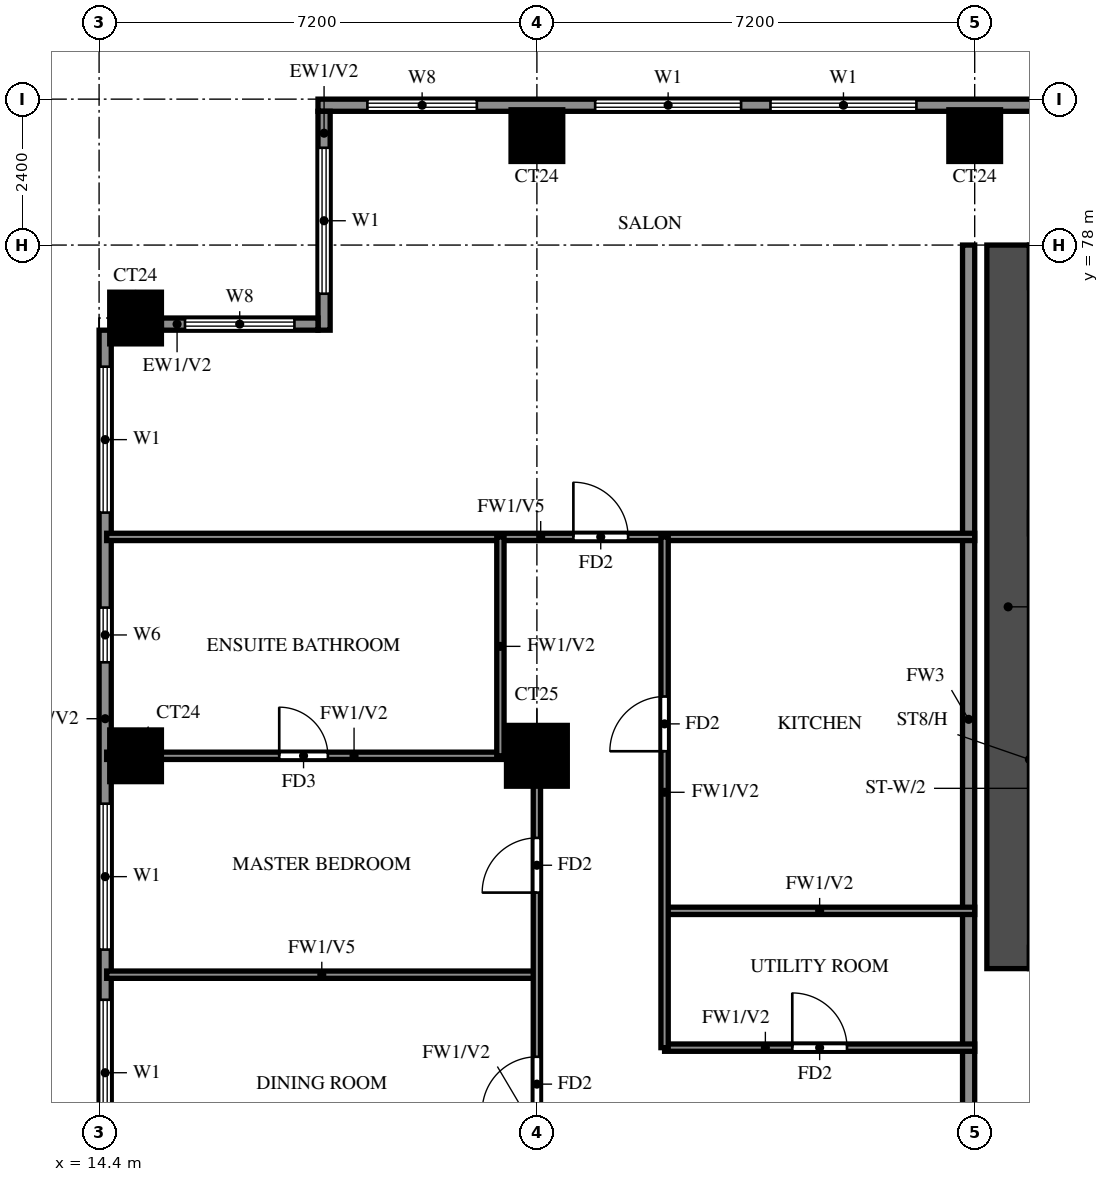
"""IFC4 building model, lengths in metres.
Left out: names, types, materials, properties, quantities, classifications, styles, units other than length and angle.
Written with IfcOpenShell. Run it as: python <this file> out.ifc"""

import sys

from ifc_helpers import new_model, si_unit, direction, frame, frame_2d, origin, origin_2d, place, context, subcontext, project, spatial, rectangle, extrude, source, transform, mapped, element, fill, save


model = new_model("IFC4")
c1 = context("Model", 3, precision=1e-05, world=origin(), true_north=direction((0.0, 1.0)))
c2 = subcontext(c1, "Body", "Model", "MODEL_VIEW")
j1 = project(units=[si_unit("LENGTHUNIT", "METRE"), si_unit("PLANEANGLEUNIT", "RADIAN")], contexts=[c1])
p1 = place(None, origin())
s1 = spatial("IfcSite", under=j1, at=p1, CompositionType="ELEMENT")
p2 = place(p1, origin())
s2 = spatial("IfcBuilding", under=s1, at=p2, CompositionType="ELEMENT")
p3 = place(p2, frame((0.0, 0.0, 143.0)))
s3 = spatial("IfcBuildingStorey", under=s2, at=p3, CompositionType="ELEMENT", Elevation=143.0)
m1 = source(origin(), c2, "Body", "SweptSolid", [
    extrude(rectangle(XDim=0.85, YDim=0.85, at=origin_2d()), origin(), (0.0, 0.0, 1.0), 3.2),
])
p4 = place(p3, frame((15.0, 69.6, 0.0), z_axis=(0.0, 0.0, 1.0), x_axis=(1.0, 0.0, 0.0)))
e1 = element("IfcColumn", 1, at=p4, inside=s3, PredefinedType="COLUMN", context=c2, shape_type="MappedRepresentation", body=[
    mapped(m1, transform((0.0, 0.0, 0.0))),
])
m2 = source(origin(), c2, "Body", "SweptSolid", [
    extrude(rectangle(XDim=1.0, YDim=1.0, at=origin_2d()), origin(), (0.0, 0.0, 1.0), 3.2),
])
p5 = place(p3, frame((21.6, 69.6, 0.0), z_axis=(0.0, 0.0, 1.0), x_axis=(1.0, 0.0, 0.0)))
e2 = element("IfcColumn", 2, at=p5, inside=s3, PredefinedType="COLUMN", context=c2, shape_type="MappedRepresentation", body=[
    mapped(m2, transform((0.0, 0.0, 0.0))),
])
for number, where, z_axis, x_axis in (
    (3, (15.0, 76.8, 0.0), (0.0, 0.0, 1.0), (1.0, 0.0, 0.0)),
    (4, (21.6, 79.8, 0.0), (0.0, 0.0, 1.0), (1.0, 0.0, 0.0)),
    (5, (28.8, 79.8, 0.0), (0.0, 0.0, 1.0), (1.0, 0.0, 0.0)),
):
    element("IfcColumn", number, at=place(p3, frame(where, z_axis=z_axis, x_axis=x_axis)), inside=s3, PredefinedType="COLUMN", context=c2, shape_type="MappedRepresentation", body=[
        mapped(m1, transform((0.0, 0.0, 0.0))),
    ])
p6 = place(p3, frame((29.35, 66.1, 0.0), z_axis=(0.0, 0.0, 1.0), x_axis=(0.0, 1.0, 0.0)))
e6 = element("IfcWall", 6, at=p6, inside=s3, PredefinedType="SHEAR", context=c2, shape_type="SweptSolid", body=[
    extrude(rectangle(XDim=11.9, YDim=0.7, at=frame_2d((5.95, 0.0))), origin(), (0.0, 0.0, 1.0), 3.2),
])
p7 = place(p3, frame((82.6, 80.3, 0.0), z_axis=(0.0, 0.0, 1.0), x_axis=(-1.0, 0.0, 0.0)))
e7 = element("IfcWall", 7, at=p7, inside=s3, PredefinedType="SOLIDWALL", context=c2, shape_type="SweptSolid", body=[
    extrude(rectangle(XDim=64.6, YDim=0.2, at=frame_2d((32.3, 0.0))), origin(), (0.0, 0.0, 1.0), 3.2),
])
p8 = place(p7, frame((7.9, 0.0, 0.0)))
e8 = element("IfcOpeningElement", 8, at=p8, cuts=e7, PredefinedType="OPENING", context=c2, shape_type="SweptSolid", body=[
    extrude(rectangle(XDim=1.8, YDim=2.4, at=frame_2d((0.9, 1.2))), frame((0.0, 0.11, 0.0), z_axis=(0.0, -1.0, 0.0), x_axis=(1.0, 0.0, 0.0)), (0.0, 0.0, 1.0), 0.22),
])
p9 = place(p7, frame((54.758, 0.0, 0.6)))
e9 = element("IfcOpeningElement", 9, at=p9, cuts=e7, PredefinedType="OPENING", context=c2, shape_type="SweptSolid", body=[
    extrude(rectangle(XDim=2.4, YDim=2.4, at=frame_2d((1.2, 1.2))), frame((0.0, 0.11, 0.0), z_axis=(0.0, -1.0, 0.0), x_axis=(1.0, 0.0, 0.0)), (0.0, 0.0, 1.0), 0.22),
])
p10 = place(p7, frame((57.642, 0.0, 0.6)))
e10 = element("IfcOpeningElement", 10, at=p10, cuts=e7, PredefinedType="OPENING", context=c2, shape_type="SweptSolid", body=[
    extrude(rectangle(XDim=2.4, YDim=2.4, at=frame_2d((1.2, 1.2))), frame((0.0, 0.11, 0.0), z_axis=(0.0, -1.0, 0.0), x_axis=(1.0, 0.0, 0.0)), (0.0, 0.0, 1.0), 0.22),
])
p11 = place(p7, frame((61.988, 0.0, 0.6)))
e11 = element("IfcOpeningElement", 11, at=p11, cuts=e7, PredefinedType="OPENING", context=c2, shape_type="SweptSolid", body=[
    extrude(rectangle(XDim=1.8, YDim=2.4, at=frame_2d((0.9, 1.2))), frame((0.0, 0.11, 0.0), z_axis=(0.0, -1.0, 0.0), x_axis=(1.0, 0.0, 0.0)), (0.0, 0.0, 1.0), 0.22),
])
p12 = place(p7, frame((0.712, 0.0, 0.6)))
e12 = element("IfcOpeningElement", 12, at=p12, cuts=e7, PredefinedType="OPENING", context=c2, shape_type="SweptSolid", body=[
    extrude(rectangle(XDim=1.8, YDim=2.4, at=frame_2d((0.9, 1.2))), frame((0.0, 0.11, 0.0), z_axis=(0.0, -1.0, 0.0), x_axis=(1.0, 0.0, 0.0)), (0.0, 0.0, 1.0), 0.22),
])
p13 = place(p7, frame((3.887, 0.0, 0.6)))
e13 = element("IfcOpeningElement", 13, at=p13, cuts=e7, PredefinedType="OPENING", context=c2, shape_type="SweptSolid", body=[
    extrude(rectangle(XDim=1.8, YDim=2.4, at=frame_2d((0.9, 1.2))), frame((0.0, 0.11, 0.0), z_axis=(0.0, -1.0, 0.0), x_axis=(1.0, 0.0, 0.0)), (0.0, 0.0, 1.0), 0.22),
])
p14 = place(p7, frame((6.55, 0.0, 0.6)))
e14 = element("IfcOpeningElement", 14, at=p14, cuts=e7, PredefinedType="OPENING", context=c2, shape_type="SweptSolid", body=[
    extrude(rectangle(XDim=0.9, YDim=2.4, at=frame_2d((0.45, 1.2))), frame((0.0, 0.11, 0.0), z_axis=(0.0, -1.0, 0.0), x_axis=(1.0, 0.0, 0.0)), (0.0, 0.0, 1.0), 0.22),
])
p15 = place(p3, frame((18.1, 80.2, 0.0), z_axis=(0.0, 0.0, 1.0), x_axis=(0.0, -1.0, 0.0)))
e15 = element("IfcWall", 15, at=p15, inside=s3, PredefinedType="SOLIDWALL", context=c2, shape_type="SweptSolid", body=[
    extrude(rectangle(XDim=3.6, YDim=0.2, at=frame_2d((1.8, 0.0))), origin(), (0.0, 0.0, 1.0), 3.2),
])
p16 = place(p15, frame((0.6, 0.0, 0.6)))
e16 = element("IfcOpeningElement", 16, at=p16, cuts=e15, PredefinedType="OPENING", context=c2, shape_type="SweptSolid", body=[
    extrude(rectangle(XDim=2.4, YDim=2.4, at=frame_2d((1.2, 1.2))), frame((0.0, 0.11, 0.0), z_axis=(0.0, -1.0, 0.0), x_axis=(1.0, 0.0, 0.0)), (0.0, 0.0, 1.0), 0.22),
])
p17 = place(p3, frame((18.0, 76.7, 0.0), z_axis=(0.0, 0.0, 1.0), x_axis=(-1.0, 0.0, 0.0)))
e17 = element("IfcWall", 17, at=p17, inside=s3, PredefinedType="SOLIDWALL", context=c2, shape_type="SweptSolid", body=[
    extrude(rectangle(XDim=2.575, YDim=0.2, at=frame_2d((1.288, 0.0))), origin(), (0.0, 0.0, 1.0), 3.2),
])
p18 = place(p17, frame((0.387, 0.0, 0.6)))
e18 = element("IfcOpeningElement", 18, at=p18, cuts=e17, PredefinedType="OPENING", context=c2, shape_type="SweptSolid", body=[
    extrude(rectangle(XDim=1.8, YDim=2.4, at=frame_2d((0.9, 1.2))), frame((0.0, 0.11, 0.0), z_axis=(0.0, -1.0, 0.0), x_axis=(1.0, 0.0, 0.0)), (0.0, 0.0, 1.0), 0.22),
])
p19 = place(p3, frame((14.5, 76.6, 0.0), z_axis=(0.0, 0.0, 1.0), x_axis=(0.0, -1.0, 0.0)))
e19 = element("IfcWall", 19, at=p19, inside=s3, PredefinedType="SOLIDWALL", context=c2, shape_type="SweptSolid", body=[
    extrude(rectangle(XDim=14.2, YDim=0.2, at=frame_2d((7.1, 0.0))), origin(), (0.0, 0.0, 1.0), 3.2),
])
p20 = place(p19, frame((11.012, 0.0, 0.6)))
e20 = element("IfcOpeningElement", 20, at=p20, cuts=e19, PredefinedType="OPENING", context=c2, shape_type="SweptSolid", body=[
    extrude(rectangle(XDim=2.4, YDim=2.4, at=frame_2d((1.2, 1.2))), frame((0.0, 0.11, 0.0), z_axis=(0.0, -1.0, 0.0), x_axis=(1.0, 0.0, 0.0)), (0.0, 0.0, 1.0), 0.22),
])
p21 = place(p19, frame((7.788, 0.0, 0.6)))
e21 = element("IfcOpeningElement", 21, at=p21, cuts=e19, PredefinedType="OPENING", context=c2, shape_type="SweptSolid", body=[
    extrude(rectangle(XDim=2.4, YDim=2.4, at=frame_2d((1.2, 1.2))), frame((0.0, 0.11, 0.0), z_axis=(0.0, -1.0, 0.0), x_axis=(1.0, 0.0, 0.0)), (0.0, 0.0, 1.0), 0.22),
])
p22 = place(p19, frame((4.562, 0.0, 1.5)))
e22 = element("IfcOpeningElement", 22, at=p22, cuts=e19, PredefinedType="OPENING", context=c2, shape_type="SweptSolid", body=[
    extrude(rectangle(XDim=0.9, YDim=0.9, at=frame_2d((0.45, 0.45))), frame((0.0, 0.11, 0.0), z_axis=(0.0, -1.0, 0.0), x_axis=(1.0, 0.0, 0.0)), (0.0, 0.0, 1.0), 0.22),
])
p23 = place(p19, frame((0.6, 0.0, 0.6)))
e23 = element("IfcOpeningElement", 23, at=p23, cuts=e19, PredefinedType="OPENING", context=c2, shape_type="SweptSolid", body=[
    extrude(rectangle(XDim=2.4, YDim=2.4, at=frame_2d((1.2, 1.2))), frame((0.0, 0.11, 0.0), z_axis=(0.0, -1.0, 0.0), x_axis=(1.0, 0.0, 0.0)), (0.0, 0.0, 1.0), 0.22),
])
p24 = place(p3, frame((28.7, 62.4, 0.0), z_axis=(0.0, 0.0, 1.0), x_axis=(0.0, 1.0, 0.0)))
e24 = element("IfcWall", 24, at=p24, inside=s3, PredefinedType="SOLIDWALL", context=c2, shape_type="SweptSolid", body=[
    extrude(rectangle(XDim=15.6, YDim=0.2, at=frame_2d((7.8, 0.0))), origin(), (0.0, 0.0, 1.0), 3.2),
])
p25 = place(p3, frame((23.7, 64.8, 0.0), z_axis=(0.0, 0.0, 1.0), x_axis=(1.0, 0.0, 0.0)))
e25 = element("IfcWall", 25, at=p25, inside=s3, PredefinedType="PARTITIONING", context=c2, shape_type="SweptSolid", body=[
    extrude(rectangle(XDim=5.1, YDim=0.12, at=frame_2d((2.55, 0.0))), origin(), (0.0, 0.0, 1.0), 3.2),
])
p26 = place(p25, frame((2.1, 0.0, 0.0)))
e26 = element("IfcOpeningElement", 26, at=p26, cuts=e25, PredefinedType="OPENING", context=c2, shape_type="SweptSolid", body=[
    extrude(rectangle(XDim=0.9, YDim=2.1, at=frame_2d((0.45, 1.05))), frame((0.0, 0.07, 0.0), z_axis=(0.0, -1.0, 0.0), x_axis=(1.0, 0.0, 0.0)), (0.0, 0.0, 1.0), 0.14),
])
p27 = place(p3, frame((14.525, 66.0, 0.0), z_axis=(0.0, 0.0, 1.0), x_axis=(1.0, 0.0, 0.0)))
e27 = element("IfcWall", 27, at=p27, inside=s3, PredefinedType="PARTITIONING", context=c2, shape_type="SweptSolid", body=[
    extrude(rectangle(XDim=7.075, YDim=0.12, at=frame_2d((3.538, 0.0))), origin(), (0.0, 0.0, 1.0), 2.3),
])
p28 = place(p3, frame((23.7, 67.05, 0.0), z_axis=(0.0, 0.0, 1.0), x_axis=(1.0, 0.0, 0.0)))
e28 = element("IfcWall", 28, at=p28, inside=s3, PredefinedType="PARTITIONING", context=c2, shape_type="SweptSolid", body=[
    extrude(rectangle(XDim=5.1, YDim=0.12, at=frame_2d((2.55, 0.0))), origin(), (0.0, 0.0, 1.0), 3.2),
])
p29 = place(p3, frame((14.525, 69.6, 0.0), z_axis=(0.0, 0.0, 1.0), x_axis=(1.0, 0.0, 0.0)))
e29 = element("IfcWall", 29, at=p29, inside=s3, PredefinedType="PARTITIONING", context=c2, shape_type="SweptSolid", body=[
    extrude(rectangle(XDim=7.075, YDim=0.12, at=frame_2d((3.538, 0.0))), origin(), (0.0, 0.0, 1.0), 3.2),
])
p30 = place(p29, frame((2.837, 0.0, 0.0)))
e30 = element("IfcOpeningElement", 30, at=p30, cuts=e29, PredefinedType="OPENING", context=c2, shape_type="SweptSolid", body=[
    extrude(rectangle(XDim=0.8, YDim=2.1, at=frame_2d((0.4, 1.05))), frame((0.0, 0.07, 0.0), z_axis=(0.0, -1.0, 0.0), x_axis=(1.0, 0.0, 0.0)), (0.0, 0.0, 1.0), 0.14),
])
p31 = place(p3, frame((14.525, 73.2, 0.0), z_axis=(0.0, 0.0, 1.0), x_axis=(1.0, 0.0, 0.0)))
e31 = element("IfcWall", 31, at=p31, inside=s3, PredefinedType="PARTITIONING", context=c2, shape_type="SweptSolid", body=[
    extrude(rectangle(XDim=14.275, YDim=0.12, at=frame_2d((7.138, 0.0))), origin(), (0.0, 0.0, 1.0), 2.3),
])
p32 = place(p31, frame((7.675, 0.0, 0.0)))
e32 = element("IfcOpeningElement", 32, at=p32, cuts=e31, PredefinedType="OPENING", context=c2, shape_type="SweptSolid", body=[
    extrude(rectangle(XDim=0.9, YDim=2.1, at=frame_2d((0.45, 1.05))), frame((0.0, 0.07, 0.0), z_axis=(0.0, -1.0, 0.0), x_axis=(1.0, 0.0, 0.0)), (0.0, 0.0, 1.0), 0.14),
])
p33 = place(p3, frame((21.0, 69.6, 0.0), z_axis=(0.0, 0.0, 1.0), x_axis=(0.0, 1.0, 0.0)))
e33 = element("IfcWall", 33, at=p33, inside=s3, PredefinedType="PARTITIONING", context=c2, shape_type="SweptSolid", body=[
    extrude(rectangle(XDim=3.6, YDim=0.12, at=frame_2d((1.8, 0.0))), origin(), (0.0, 0.0, 1.0), 3.2),
])
p34 = place(p3, frame((21.6, 58.8, 0.0), z_axis=(0.0, 0.0, 1.0), x_axis=(0.0, 1.0, 0.0)))
e34 = element("IfcWall", 34, at=p34, inside=s3, PredefinedType="PARTITIONING", context=c2, shape_type="SweptSolid", body=[
    extrude(rectangle(XDim=10.8, YDim=0.12, at=frame_2d((5.4, 0.0))), origin(), (0.0, 0.0, 1.0), 3.2),
])
p35 = place(p34, frame((1.35, 0.0, 0.0)))
e35 = element("IfcOpeningElement", 35, at=p35, cuts=e34, PredefinedType="OPENING", context=c2, shape_type="SweptSolid", body=[
    extrude(rectangle(XDim=0.9, YDim=2.1, at=frame_2d((0.45, 1.05))), frame((0.0, 0.07, 0.0), z_axis=(0.0, -1.0, 0.0), x_axis=(1.0, 0.0, 0.0)), (0.0, 0.0, 1.0), 0.14),
])
p36 = place(p34, frame((4.95, 0.0, 0.0)))
e36 = element("IfcOpeningElement", 36, at=p36, cuts=e34, PredefinedType="OPENING", context=c2, shape_type="SweptSolid", body=[
    extrude(rectangle(XDim=0.9, YDim=2.1, at=frame_2d((0.45, 1.05))), frame((0.0, 0.07, 0.0), z_axis=(0.0, -1.0, 0.0), x_axis=(1.0, 0.0, 0.0)), (0.0, 0.0, 1.0), 0.14),
])
p37 = place(p34, frame((8.55, 0.0, 0.0)))
e37 = element("IfcOpeningElement", 37, at=p37, cuts=e34, PredefinedType="OPENING", context=c2, shape_type="SweptSolid", body=[
    extrude(rectangle(XDim=0.9, YDim=2.1, at=frame_2d((0.45, 1.05))), frame((0.0, 0.07, 0.0), z_axis=(0.0, -1.0, 0.0), x_axis=(1.0, 0.0, 0.0)), (0.0, 0.0, 1.0), 0.14),
])
p38 = place(p3, frame((23.7, 64.8, 0.0), z_axis=(0.0, 0.0, 1.0), x_axis=(0.0, 1.0, 0.0)))
e38 = element("IfcWall", 38, at=p38, inside=s3, PredefinedType="PARTITIONING", context=c2, shape_type="SweptSolid", body=[
    extrude(rectangle(XDim=8.4, YDim=0.12, at=frame_2d((4.2, 0.0))), origin(), (0.0, 0.0, 1.0), 3.2),
])
p39 = place(p38, frame((4.875, 0.0, 0.0)))
e39 = element("IfcOpeningElement", 39, at=p39, cuts=e38, PredefinedType="OPENING", context=c2, shape_type="SweptSolid", body=[
    extrude(rectangle(XDim=0.9, YDim=2.1, at=frame_2d((0.45, 1.05))), frame((0.0, 0.07, 0.0), z_axis=(0.0, -1.0, 0.0), x_axis=(1.0, 0.0, 0.0)), (0.0, 0.0, 1.0), 0.14),
])
p40 = place(p9, origin())
e40 = element("IfcWindow", 40, at=p40, inside=s3, PartitioningType="DOUBLE_PANEL_VERTICAL", PredefinedType="WINDOW", context=c2, shape_type="SweptSolid", body=[
    extrude(rectangle(XDim=2.4, YDim=2.4, at=frame_2d((1.2, 1.2))), frame((0.0, 0.03, 0.0), z_axis=(0.0, -1.0, 0.0), x_axis=(1.0, 0.0, 0.0)), (0.0, 0.0, 1.0), 0.06),
])
fill(e9, e40)
p41 = place(p10, origin())
e41 = element("IfcWindow", 41, at=p41, inside=s3, PartitioningType="DOUBLE_PANEL_VERTICAL", PredefinedType="WINDOW", context=c2, shape_type="SweptSolid", body=[
    extrude(rectangle(XDim=2.4, YDim=2.4, at=frame_2d((1.2, 1.2))), frame((0.0, 0.03, 0.0), z_axis=(0.0, -1.0, 0.0), x_axis=(1.0, 0.0, 0.0)), (0.0, 0.0, 1.0), 0.06),
])
fill(e10, e41)
p42 = place(p11, origin())
e42 = element("IfcWindow", 42, at=p42, inside=s3, PartitioningType="DOUBLE_PANEL_VERTICAL", PredefinedType="WINDOW", context=c2, shape_type="SweptSolid", body=[
    extrude(rectangle(XDim=1.8, YDim=2.4, at=frame_2d((0.9, 1.2))), frame((0.0, 0.03, 0.0), z_axis=(0.0, -1.0, 0.0), x_axis=(1.0, 0.0, 0.0)), (0.0, 0.0, 1.0), 0.06),
])
fill(e11, e42)
p43 = place(p16, origin())
e43 = element("IfcWindow", 43, at=p43, inside=s3, PartitioningType="DOUBLE_PANEL_VERTICAL", PredefinedType="WINDOW", context=c2, shape_type="SweptSolid", body=[
    extrude(rectangle(XDim=2.4, YDim=2.4, at=frame_2d((1.2, 1.2))), frame((0.0, 0.03, 0.0), z_axis=(0.0, -1.0, 0.0), x_axis=(1.0, 0.0, 0.0)), (0.0, 0.0, 1.0), 0.06),
])
fill(e16, e43)
p44 = place(p18, origin())
e44 = element("IfcWindow", 44, at=p44, inside=s3, PartitioningType="DOUBLE_PANEL_VERTICAL", PredefinedType="WINDOW", context=c2, shape_type="SweptSolid", body=[
    extrude(rectangle(XDim=1.8, YDim=2.4, at=frame_2d((0.9, 1.2))), frame((0.0, 0.03, 0.0), z_axis=(0.0, -1.0, 0.0), x_axis=(1.0, 0.0, 0.0)), (0.0, 0.0, 1.0), 0.06),
])
fill(e18, e44)
p45 = place(p20, origin())
e45 = element("IfcWindow", 45, at=p45, inside=s3, PartitioningType="DOUBLE_PANEL_VERTICAL", PredefinedType="WINDOW", context=c2, shape_type="SweptSolid", body=[
    extrude(rectangle(XDim=2.4, YDim=2.4, at=frame_2d((1.2, 1.2))), frame((0.0, 0.03, 0.0), z_axis=(0.0, -1.0, 0.0), x_axis=(1.0, 0.0, 0.0)), (0.0, 0.0, 1.0), 0.06),
])
fill(e20, e45)
p46 = place(p21, origin())
e46 = element("IfcWindow", 46, at=p46, inside=s3, PartitioningType="DOUBLE_PANEL_VERTICAL", PredefinedType="WINDOW", context=c2, shape_type="SweptSolid", body=[
    extrude(rectangle(XDim=2.4, YDim=2.4, at=frame_2d((1.2, 1.2))), frame((0.0, 0.03, 0.0), z_axis=(0.0, -1.0, 0.0), x_axis=(1.0, 0.0, 0.0)), (0.0, 0.0, 1.0), 0.06),
])
fill(e21, e46)
p47 = place(p22, origin())
e47 = element("IfcWindow", 47, at=p47, inside=s3, PartitioningType="SINGLE_PANEL", PredefinedType="WINDOW", context=c2, shape_type="SweptSolid", body=[
    extrude(rectangle(XDim=0.9, YDim=0.9, at=frame_2d((0.45, 0.45))), frame((0.0, 0.03, 0.0), z_axis=(0.0, -1.0, 0.0), x_axis=(1.0, 0.0, 0.0)), (0.0, 0.0, 1.0), 0.06),
])
fill(e22, e47)
p48 = place(p23, origin())
e48 = element("IfcWindow", 48, at=p48, inside=s3, PartitioningType="DOUBLE_PANEL_VERTICAL", PredefinedType="WINDOW", context=c2, shape_type="SweptSolid", body=[
    extrude(rectangle(XDim=2.4, YDim=2.4, at=frame_2d((1.2, 1.2))), frame((0.0, 0.03, 0.0), z_axis=(0.0, -1.0, 0.0), x_axis=(1.0, 0.0, 0.0)), (0.0, 0.0, 1.0), 0.06),
])
fill(e23, e48)
p49 = place(p36, origin())
e49 = element("IfcDoor", 49, at=p49, inside=s3, OperationType="SINGLE_SWING_RIGHT", PredefinedType="DOOR", context=c2, shape_type="SweptSolid", body=[
    extrude(rectangle(XDim=0.9, YDim=2.1, at=frame_2d((0.45, 1.05))), frame((0.0, 0.025, 0.0), z_axis=(0.0, -1.0, 0.0), x_axis=(1.0, 0.0, 0.0)), (0.0, 0.0, 1.0), 0.05),
])
fill(e36, e49)
p50 = place(p37, origin())
e50 = element("IfcDoor", 50, at=p50, inside=s3, OperationType="SINGLE_SWING_LEFT", PredefinedType="DOOR", context=c2, shape_type="SweptSolid", body=[
    extrude(rectangle(XDim=0.9, YDim=2.1, at=frame_2d((0.45, 1.05))), frame((0.0, 0.025, 0.0), z_axis=(0.0, -1.0, 0.0), x_axis=(1.0, 0.0, 0.0)), (0.0, 0.0, 1.0), 0.05),
])
fill(e37, e50)
p51 = place(p30, origin())
e51 = element("IfcDoor", 51, at=p51, inside=s3, OperationType="SINGLE_SWING_LEFT", PredefinedType="DOOR", context=c2, shape_type="SweptSolid", body=[
    extrude(rectangle(XDim=0.8, YDim=2.1, at=frame_2d((0.4, 1.05))), frame((0.0, 0.025, 0.0), z_axis=(0.0, -1.0, 0.0), x_axis=(1.0, 0.0, 0.0)), (0.0, 0.0, 1.0), 0.05),
])
fill(e30, e51)
p52 = place(p32, origin())
e52 = element("IfcDoor", 52, at=p52, inside=s3, OperationType="SINGLE_SWING_RIGHT", PredefinedType="DOOR", context=c2, shape_type="SweptSolid", body=[
    extrude(rectangle(XDim=0.9, YDim=2.1, at=frame_2d((0.45, 1.05))), frame((0.0, 0.025, 0.0), z_axis=(0.0, -1.0, 0.0), x_axis=(1.0, 0.0, 0.0)), (0.0, 0.0, 1.0), 0.05),
])
fill(e32, e52)
p53 = place(p26, origin())
e53 = element("IfcDoor", 53, at=p53, inside=s3, OperationType="SINGLE_SWING_LEFT", PredefinedType="DOOR", context=c2, shape_type="SweptSolid", body=[
    extrude(rectangle(XDim=0.9, YDim=2.1, at=frame_2d((0.45, 1.05))), frame((0.0, 0.025, 0.0), z_axis=(0.0, -1.0, 0.0), x_axis=(1.0, 0.0, 0.0)), (0.0, 0.0, 1.0), 0.05),
])
fill(e26, e53)
p54 = place(p39, origin())
e54 = element("IfcDoor", 54, at=p54, inside=s3, OperationType="SINGLE_SWING_LEFT", PredefinedType="DOOR", context=c2, shape_type="SweptSolid", body=[
    extrude(rectangle(XDim=0.9, YDim=2.1, at=frame_2d((0.45, 1.05))), frame((0.0, 0.025, 0.0), z_axis=(0.0, -1.0, 0.0), x_axis=(1.0, 0.0, 0.0)), (0.0, 0.0, 1.0), 0.05),
])
fill(e39, e54)
save(model, sys.argv[1])
